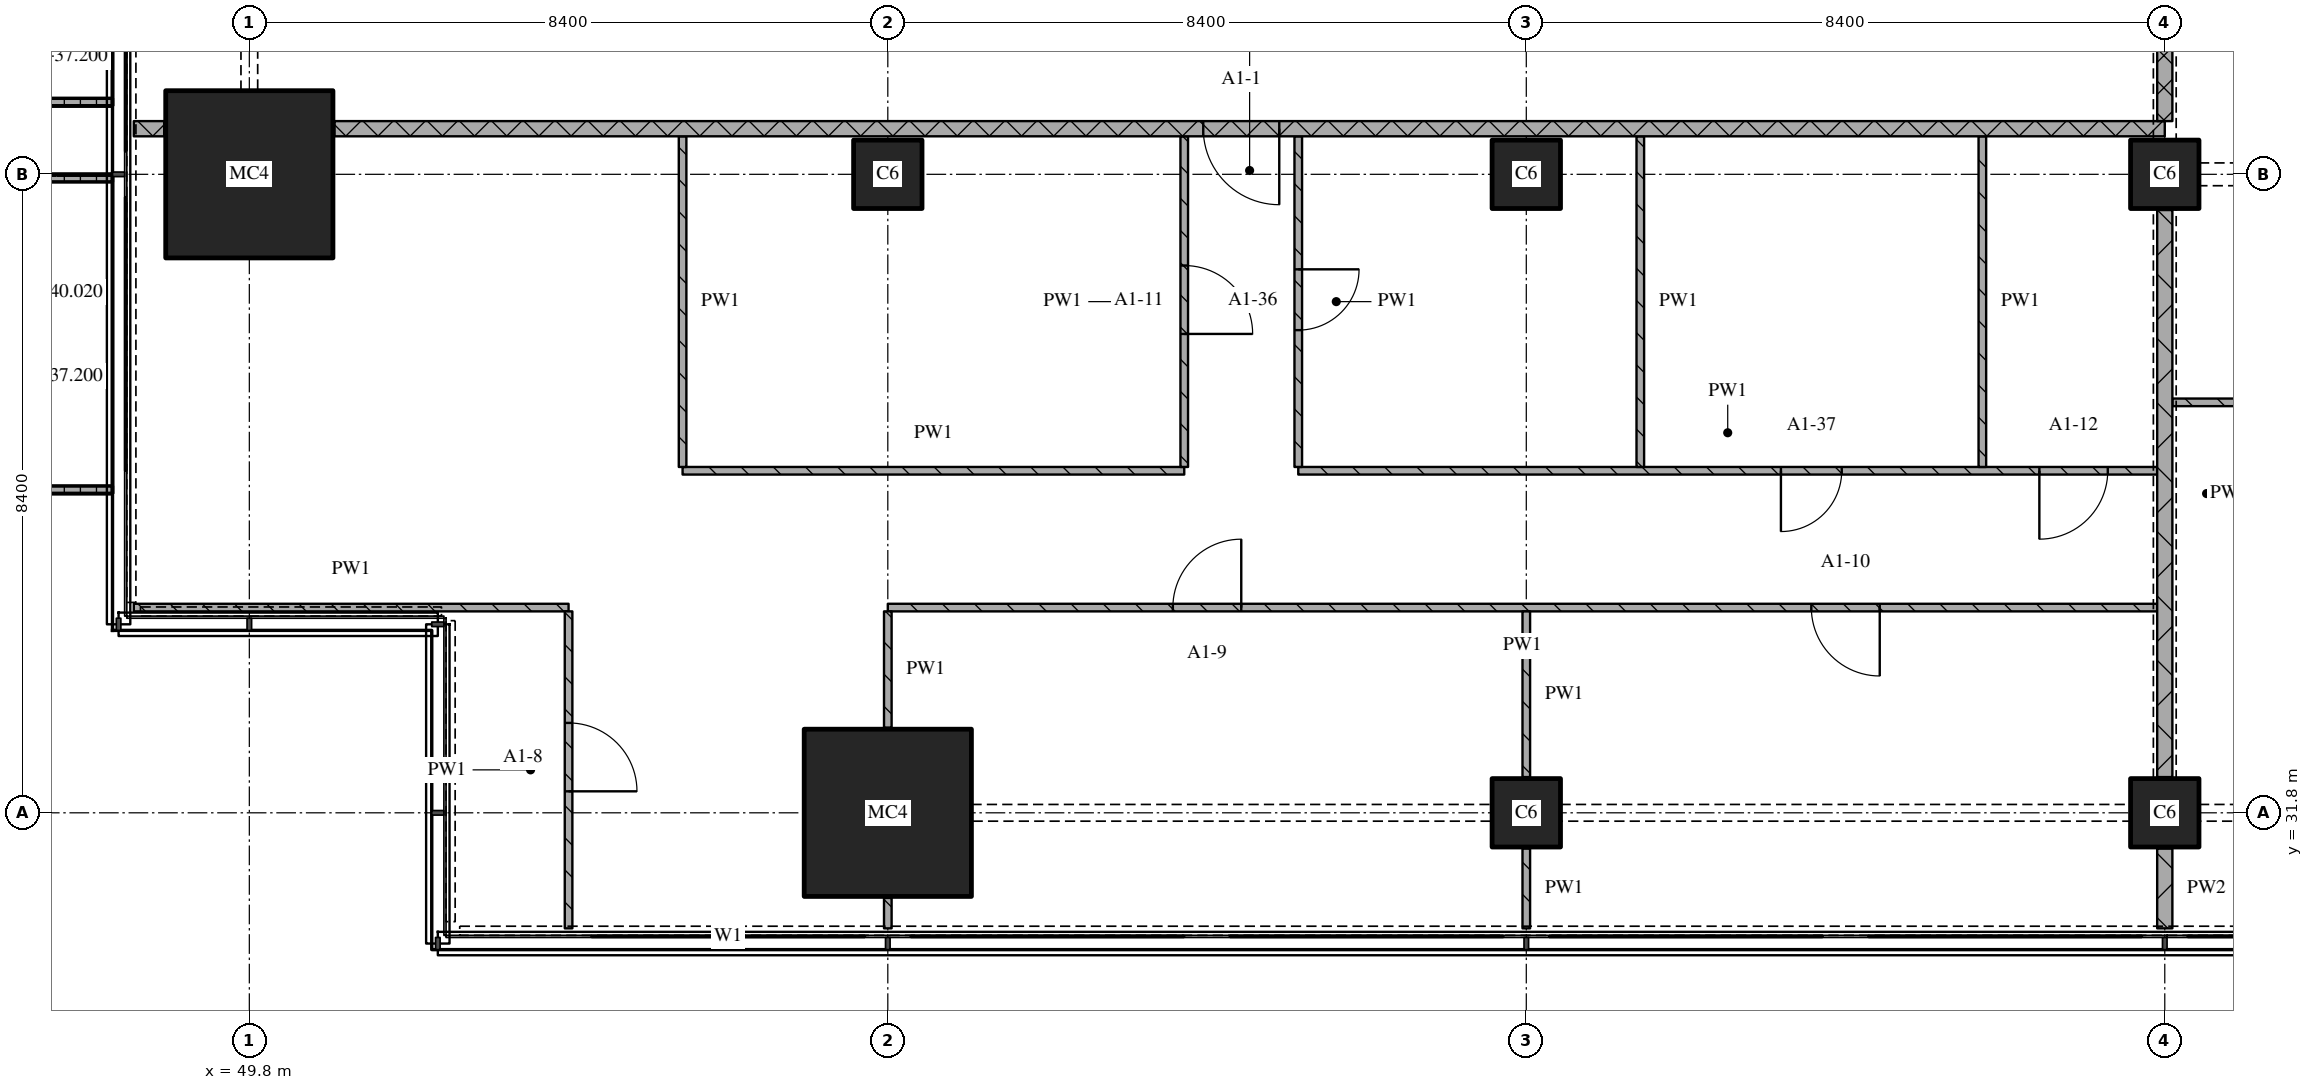
"""IFC4 building model, lengths in metres.
Left out: names, types, materials, properties, quantities, classifications, styles, units other than length and angle.
Written with IfcOpenShell. Run it as: python <this file> out.ifc"""

import sys

from ifc_helpers import new_model, si_unit, direction, frame, frame_2d, origin, origin_2d, place, context, subcontext, project, spatial, polyline, rectangle, outline, extrude, element, fill, save


model = new_model("IFC4")
c1 = context("Model", 3, precision=1e-05, world=origin(), true_north=direction((0.0, 1.0)))
c2 = subcontext(c1, "Body", "Model", "MODEL_VIEW")
j1 = project(units=[si_unit("LENGTHUNIT", "METRE"), si_unit("PLANEANGLEUNIT", "RADIAN")], contexts=[c1])
p1 = place(None, origin())
s1 = spatial("IfcSite", under=j1, at=p1, CompositionType="ELEMENT")
p2 = place(p1, origin())
s2 = spatial("IfcBuilding", under=s1, at=p2, CompositionType="ELEMENT")
p3 = place(p2, frame((0.0, 0.0, 37.2)))
s3 = spatial("IfcBuildingStorey", under=s2, at=p3, CompositionType="ELEMENT", Elevation=37.2)
for number, where, z_axis, x_axis in (
    (1, (49.8, 40.2, 0.0), (0.0, 0.0, 1.0), (1.0, 0.0, 0.0)),
    (2, (58.2, 31.8, 0.0), (0.0, 0.0, 1.0), (1.0, 0.0, 0.0)),
):
    element("IfcColumn", number, at=place(p3, frame(where, z_axis=z_axis, x_axis=x_axis)), inside=s3, PredefinedType="COLUMN", context=c2, shape_type="SweptSolid", body=[
        extrude(rectangle(XDim=2.2, YDim=2.2, at=origin_2d()), origin(), (0.0, 0.0, 1.0), 3.6),
    ])
for number, where, z_axis, x_axis in (
    (3, (58.2, 40.2, 0.0), (0.0, 0.0, 1.0), (1.0, 0.0, 0.0)),
    (4, (66.6, 31.8, 0.0), (0.0, 0.0, 1.0), (1.0, 0.0, 0.0)),
    (5, (66.6, 40.2, 0.0), (0.0, 0.0, 1.0), (1.0, 0.0, 0.0)),
    (6, (75.0, 31.8, 0.0), (0.0, 0.0, 1.0), (1.0, 0.0, 0.0)),
    (7, (75.0, 40.2, 0.0), (0.0, 0.0, 1.0), (1.0, 0.0, 0.0)),
):
    element("IfcColumn", number, at=place(p3, frame(where, z_axis=z_axis, x_axis=x_axis)), inside=s3, PredefinedType="COLUMN", context=c2, shape_type="SweptSolid", body=[
        extrude(rectangle(XDim=0.9, YDim=0.9, at=origin_2d()), origin(), (0.0, 0.0, 1.0), 3.6),
    ])
p4 = place(p3, origin())
e8 = element("IfcWall", 8, at=p4, inside=s3, PredefinedType="SOLIDWALL", context=c2, shape_type="SweptSolid", body=[
    extrude(outline(polyline([(48.0, 43.5), (48.0, 43.4), (46.5, 43.4), (46.5, 41.2), (48.0, 41.2), (48.0, 41.1), (46.4, 41.1), (46.4, 43.5), (48.0, 43.5)])), origin(), (0.0, 0.0, 1.0), 1.0),
])
p5 = place(p3, origin())
e9 = element("IfcWall", 9, at=p5, inside=s3, PredefinedType="SOLIDWALL", context=c2, shape_type="SweptSolid", body=[
    extrude(outline(polyline([(48.0, 40.2), (48.0, 40.1), (46.367, 40.1), (46.367, 36.1), (48.0, 36.1), (48.0, 36.0), (46.267, 36.0), (46.267, 40.2), (48.0, 40.2)])), origin(), (0.0, 0.0, 1.0), 1.0),
])
p6 = place(p3, frame((48.28, 34.5, 0.0), z_axis=(0.0, 0.0, 1.0), x_axis=(1.0, 0.0, 0.0)))
e10 = element("IfcWall", 10, at=p6, inside=s3, PredefinedType="PARTITIONING", context=c2, shape_type="SweptSolid", body=[
    extrude(rectangle(XDim=5.72, YDim=0.1, at=frame_2d((2.86, 0.0))), origin(), (0.0, 0.0, 1.0), 3.32),
])
p7 = place(p3, frame((74.9, 34.5, 0.0), z_axis=(0.0, 0.0, 1.0), x_axis=(-1.0, 0.0, 0.0)))
e11 = element("IfcWall", 11, at=p7, inside=s3, PredefinedType="PARTITIONING", context=c2, shape_type="SweptSolid", body=[
    extrude(rectangle(XDim=16.7, YDim=0.1, at=frame_2d((8.35, 0.0))), origin(), (0.0, 0.0, 1.0), 3.32),
])
p8 = place(p7, frame((3.65, 0.0, 0.0)))
e12 = element("IfcOpeningElement", 12, at=p8, cuts=e11, PredefinedType="OPENING", context=c2, shape_type="SweptSolid", body=[
    extrude(rectangle(XDim=0.9, YDim=2.1, at=frame_2d((0.45, 1.05))), frame((0.0, 0.06, 0.0), z_axis=(0.0, -1.0, 0.0), x_axis=(1.0, 0.0, 0.0)), (0.0, 0.0, 1.0), 0.12),
])
p9 = place(p7, frame((12.05, 0.0, 0.0)))
e13 = element("IfcOpeningElement", 13, at=p9, cuts=e11, PredefinedType="OPENING", context=c2, shape_type="SweptSolid", body=[
    extrude(rectangle(XDim=0.9, YDim=2.1, at=frame_2d((0.45, 1.05))), frame((0.0, 0.06, 0.0), z_axis=(0.0, -1.0, 0.0), x_axis=(1.0, 0.0, 0.0)), (0.0, 0.0, 1.0), 0.12),
])
p10 = place(p3, frame((55.5, 36.3, 0.0), z_axis=(0.0, 0.0, 1.0), x_axis=(1.0, 0.0, 0.0)))
e14 = element("IfcWall", 14, at=p10, inside=s3, PredefinedType="PARTITIONING", context=c2, shape_type="SweptSolid", body=[
    extrude(rectangle(XDim=6.6, YDim=0.1, at=frame_2d((3.3, 0.0))), origin(), (0.0, 0.0, 1.0), 3.32),
])
p11 = place(p3, frame((63.6, 36.3, 0.0), z_axis=(0.0, 0.0, 1.0), x_axis=(1.0, 0.0, 0.0)))
e15 = element("IfcWall", 15, at=p11, inside=s3, PredefinedType="PARTITIONING", context=c2, shape_type="SweptSolid", body=[
    extrude(rectangle(XDim=11.3, YDim=0.1, at=frame_2d((5.65, 0.0))), origin(), (0.0, 0.0, 1.0), 3.32),
])
p12 = place(p11, frame((6.35, 0.0, 0.0)))
e16 = element("IfcOpeningElement", 16, at=p12, cuts=e15, PredefinedType="OPENING", context=c2, shape_type="SweptSolid", body=[
    extrude(rectangle(XDim=0.8, YDim=2.1, at=frame_2d((0.4, 1.05))), frame((0.0, 0.06, 0.0), z_axis=(0.0, -1.0, 0.0), x_axis=(1.0, 0.0, 0.0)), (0.0, 0.0, 1.0), 0.12),
])
p13 = place(p11, frame((9.75, 0.0, 0.0)))
e17 = element("IfcOpeningElement", 17, at=p13, cuts=e15, PredefinedType="OPENING", context=c2, shape_type="SweptSolid", body=[
    extrude(rectangle(XDim=0.9, YDim=2.1, at=frame_2d((0.45, 1.05))), frame((0.0, 0.06, 0.0), z_axis=(0.0, -1.0, 0.0), x_axis=(1.0, 0.0, 0.0)), (0.0, 0.0, 1.0), 0.12),
])
p14 = place(p3, frame((87.6, 37.2, 0.0), z_axis=(0.0, 0.0, 1.0), x_axis=(-1.0, 0.0, 0.0)))
e18 = element("IfcWall", 18, at=p14, inside=s3, PredefinedType="PARTITIONING", context=c2, shape_type="SweptSolid", body=[
    extrude(rectangle(XDim=12.5, YDim=0.1, at=frame_2d((6.25, 0.0))), origin(), (0.0, 0.0, 1.0), 3.32),
])
p15 = place(p14, frame((5.85, 0.0, 0.0)))
e19 = element("IfcOpeningElement", 19, at=p15, cuts=e18, PredefinedType="OPENING", context=c2, shape_type="SweptSolid", body=[
    extrude(rectangle(XDim=0.9, YDim=2.1, at=frame_2d((0.45, 1.05))), frame((0.0, 0.06, 0.0), z_axis=(0.0, -1.0, 0.0), x_axis=(1.0, 0.0, 0.0)), (0.0, 0.0, 1.0), 0.12),
])
p16 = place(p14, frame((10.05, 0.0, 0.0)))
e20 = element("IfcOpeningElement", 20, at=p16, cuts=e18, PredefinedType="OPENING", context=c2, shape_type="SweptSolid", body=[
    extrude(rectangle(XDim=0.9, YDim=2.1, at=frame_2d((0.45, 1.05))), frame((0.0, 0.06, 0.0), z_axis=(0.0, -1.0, 0.0), x_axis=(1.0, 0.0, 0.0)), (0.0, 0.0, 1.0), 0.12),
])
p17 = place(p3, frame((48.28, 40.8, 0.0), z_axis=(0.0, 0.0, 1.0), x_axis=(1.0, 0.0, 0.0)))
e21 = element("IfcWall", 21, at=p17, inside=s3, PredefinedType="PARTITIONING", context=c2, shape_type="SweptSolid", body=[
    extrude(rectangle(XDim=0.4, YDim=0.2, at=frame_2d((0.2, 0.0))), origin(), (0.0, 0.0, 1.0), 3.32),
])
p18 = place(p3, frame((75.0, 40.8, 0.0), z_axis=(0.0, 0.0, 1.0), x_axis=(-1.0, 0.0, 0.0)))
e22 = element("IfcWall", 22, at=p18, inside=s3, PredefinedType="PARTITIONING", context=c2, shape_type="SweptSolid", body=[
    extrude(rectangle(XDim=24.08, YDim=0.2, at=frame_2d((12.04, 0.0))), origin(), (0.0, 0.0, 1.0), 3.32),
])
p19 = place(p18, frame((11.65, 0.0, 0.0)))
e23 = element("IfcOpeningElement", 23, at=p19, cuts=e22, PredefinedType="OPENING", context=c2, shape_type="SweptSolid", body=[
    extrude(rectangle(XDim=1.0, YDim=2.1, at=frame_2d((0.5, 1.05))), frame((0.0, 0.11, 0.0), z_axis=(0.0, -1.0, 0.0), x_axis=(1.0, 0.0, 0.0)), (0.0, 0.0, 1.0), 0.22),
])
p20 = place(p3, frame((54.0, 30.28, 0.0), z_axis=(0.0, 0.0, 1.0), x_axis=(0.0, 1.0, 0.0)))
e24 = element("IfcWall", 24, at=p20, inside=s3, PredefinedType="PARTITIONING", context=c2, shape_type="SweptSolid", body=[
    extrude(rectangle(XDim=4.17, YDim=0.1, at=frame_2d((2.085, 0.0))), origin(), (0.0, 0.0, 1.0), 3.32),
])
p21 = place(p20, frame((1.803, 0.0, 0.0)))
e25 = element("IfcOpeningElement", 25, at=p21, cuts=e24, PredefinedType="OPENING", context=c2, shape_type="SweptSolid", body=[
    extrude(rectangle(XDim=0.9, YDim=2.1, at=frame_2d((0.45, 1.05))), frame((0.0, 0.06, 0.0), z_axis=(0.0, -1.0, 0.0), x_axis=(1.0, 0.0, 0.0)), (0.0, 0.0, 1.0), 0.12),
])
p22 = place(p3, frame((55.5, 40.7, 0.0), z_axis=(0.0, 0.0, 1.0), x_axis=(0.0, -1.0, 0.0)))
e26 = element("IfcWall", 26, at=p22, inside=s3, PredefinedType="PARTITIONING", context=c2, shape_type="SweptSolid", body=[
    extrude(rectangle(XDim=4.35, YDim=0.1, at=frame_2d((2.175, 0.0))), origin(), (0.0, 0.0, 1.0), 3.32),
])
p23 = place(p3, frame((58.2, 30.68, 0.0), z_axis=(0.0, 0.0, 1.0), x_axis=(0.0, -1.0, 0.0)))
e27 = element("IfcWall", 27, at=p23, inside=s3, PredefinedType="PARTITIONING", context=c2, shape_type="SweptSolid", body=[
    extrude(rectangle(XDim=0.4, YDim=0.1, at=frame_2d((0.2, 0.0))), origin(), (0.0, 0.0, 1.0), 3.32),
])
p24 = place(p3, frame((58.2, 34.45, 0.0), z_axis=(0.0, 0.0, 1.0), x_axis=(0.0, -1.0, 0.0)))
e28 = element("IfcWall", 28, at=p24, inside=s3, PredefinedType="PARTITIONING", context=c2, shape_type="SweptSolid", body=[
    extrude(rectangle(XDim=1.53, YDim=0.1, at=frame_2d((0.765, 0.0))), origin(), (0.0, 0.0, 1.0), 3.32),
])
p25 = place(p3, frame((62.1, 36.35, 0.0), z_axis=(0.0, 0.0, 1.0), x_axis=(0.0, 1.0, 0.0)))
e29 = element("IfcWall", 29, at=p25, inside=s3, PredefinedType="PARTITIONING", context=c2, shape_type="SweptSolid", body=[
    extrude(rectangle(XDim=4.35, YDim=0.1, at=frame_2d((2.175, 0.0))), origin(), (0.0, 0.0, 1.0), 3.32),
])
p26 = place(p25, frame((1.75, 0.0, 0.0)))
e30 = element("IfcOpeningElement", 30, at=p26, cuts=e29, PredefinedType="OPENING", context=c2, shape_type="SweptSolid", body=[
    extrude(rectangle(XDim=0.9, YDim=2.1, at=frame_2d((0.45, 1.05))), frame((0.0, 0.06, 0.0), z_axis=(0.0, -1.0, 0.0), x_axis=(1.0, 0.0, 0.0)), (0.0, 0.0, 1.0), 0.12),
])
p27 = place(p3, frame((63.6, 40.7, 0.0), z_axis=(0.0, 0.0, 1.0), x_axis=(0.0, -1.0, 0.0)))
e31 = element("IfcWall", 31, at=p27, inside=s3, PredefinedType="PARTITIONING", context=c2, shape_type="SweptSolid", body=[
    extrude(rectangle(XDim=4.35, YDim=0.1, at=frame_2d((2.175, 0.0))), origin(), (0.0, 0.0, 1.0), 3.32),
])
p28 = place(p27, frame((1.75, 0.0, 0.0)))
e32 = element("IfcOpeningElement", 32, at=p28, cuts=e31, PredefinedType="OPENING", context=c2, shape_type="SweptSolid", body=[
    extrude(rectangle(XDim=0.8, YDim=2.1, at=frame_2d((0.4, 1.05))), frame((0.0, 0.06, 0.0), z_axis=(0.0, -1.0, 0.0), x_axis=(1.0, 0.0, 0.0)), (0.0, 0.0, 1.0), 0.12),
])
p29 = place(p3, frame((66.6, 31.33, 0.0), z_axis=(0.0, 0.0, 1.0), x_axis=(0.0, -1.0, 0.0)))
e33 = element("IfcWall", 33, at=p29, inside=s3, PredefinedType="PARTITIONING", context=c2, shape_type="SweptSolid", body=[
    extrude(rectangle(XDim=1.05, YDim=0.1, at=frame_2d((0.525, 0.0))), origin(), (0.0, 0.0, 1.0), 3.32),
])
p30 = place(p3, frame((66.6, 34.45, 0.0), z_axis=(0.0, 0.0, 1.0), x_axis=(0.0, -1.0, 0.0)))
e34 = element("IfcWall", 34, at=p30, inside=s3, PredefinedType="PARTITIONING", context=c2, shape_type="SweptSolid", body=[
    extrude(rectangle(XDim=2.18, YDim=0.1, at=frame_2d((1.09, 0.0))), origin(), (0.0, 0.0, 1.0), 3.32),
])
for number, where, z_axis, x_axis in (
    (35, (68.1, 40.7, 0.0), (0.0, 0.0, 1.0), (0.0, -1.0, 0.0)),
    (36, (72.6, 40.7, 0.0), (0.0, 0.0, 1.0), (0.0, -1.0, 0.0)),
):
    element("IfcWall", number, at=place(p3, frame(where, z_axis=z_axis, x_axis=x_axis)), inside=s3, PredefinedType="PARTITIONING", context=c2, shape_type="SweptSolid", body=[
        extrude(rectangle(XDim=4.35, YDim=0.1, at=frame_2d((2.175, 0.0))), origin(), (0.0, 0.0, 1.0), 3.32),
    ])
p31 = place(p3, frame((75.0, 43.1, 0.0), z_axis=(0.0, 0.0, 1.0), x_axis=(0.0, -1.0, 0.0)))
e37 = element("IfcWall", 37, at=p31, inside=s3, PredefinedType="PARTITIONING", context=c2, shape_type="SweptSolid", body=[
    extrude(rectangle(XDim=2.2, YDim=0.2, at=frame_2d((1.1, 0.0))), origin(), (0.0, 0.0, 1.0), 2.43),
])
p32 = place(p3, frame((75.0, 31.33, 0.0), z_axis=(0.0, 0.0, 1.0), x_axis=(0.0, -1.0, 0.0)))
e38 = element("IfcWall", 38, at=p32, inside=s3, PredefinedType="PARTITIONING", context=c2, shape_type="SweptSolid", body=[
    extrude(rectangle(XDim=1.05, YDim=0.2, at=frame_2d((0.525, 0.0))), origin(), (0.0, 0.0, 1.0), 3.32),
])
p33 = place(p3, frame((75.0, 39.73, 0.0), z_axis=(0.0, 0.0, 1.0), x_axis=(0.0, -1.0, 0.0)))
e39 = element("IfcWall", 39, at=p33, inside=s3, PredefinedType="PARTITIONING", context=c2, shape_type="SweptSolid", body=[
    extrude(rectangle(XDim=7.46, YDim=0.2, at=frame_2d((3.73, 0.0))), origin(), (0.0, 0.0, 1.0), 2.83),
])
p34 = place(p8, origin())
e40 = element("IfcDoor", 40, at=p34, inside=s3, OperationType="SINGLE_SWING_LEFT", PredefinedType="DOOR", context=c2, shape_type="SweptSolid", body=[
    extrude(rectangle(XDim=0.9, YDim=2.1, at=frame_2d((0.45, 1.05))), frame((0.0, 0.025, 0.0), z_axis=(0.0, -1.0, 0.0), x_axis=(1.0, 0.0, 0.0)), (0.0, 0.0, 1.0), 0.05),
])
fill(e12, e40)
p35 = place(p9, origin())
e41 = element("IfcDoor", 41, at=p35, inside=s3, OperationType="SINGLE_SWING_RIGHT", PredefinedType="DOOR", context=c2, shape_type="SweptSolid", body=[
    extrude(rectangle(XDim=0.9, YDim=2.1, at=frame_2d((0.45, 1.05))), frame((0.0, 0.025, 0.0), z_axis=(0.0, -1.0, 0.0), x_axis=(1.0, 0.0, 0.0)), (0.0, 0.0, 1.0), 0.05),
])
fill(e13, e41)
p36 = place(p12, origin())
e42 = element("IfcDoor", 42, at=p36, inside=s3, OperationType="SINGLE_SWING_RIGHT", PredefinedType="DOOR", context=c2, shape_type="SweptSolid", body=[
    extrude(rectangle(XDim=0.8, YDim=2.1, at=frame_2d((0.4, 1.05))), frame((0.0, 0.025, 0.0), z_axis=(0.0, -1.0, 0.0), x_axis=(1.0, 0.0, 0.0)), (0.0, 0.0, 1.0), 0.05),
])
fill(e16, e42)
p37 = place(p13, origin())
e43 = element("IfcDoor", 43, at=p37, inside=s3, OperationType="SINGLE_SWING_RIGHT", PredefinedType="DOOR", context=c2, shape_type="SweptSolid", body=[
    extrude(rectangle(XDim=0.9, YDim=2.1, at=frame_2d((0.45, 1.05))), frame((0.0, 0.025, 0.0), z_axis=(0.0, -1.0, 0.0), x_axis=(1.0, 0.0, 0.0)), (0.0, 0.0, 1.0), 0.05),
])
fill(e17, e43)
p38 = place(p19, origin())
e44 = element("IfcDoor", 44, at=p38, inside=s3, OperationType="SINGLE_SWING_LEFT", PredefinedType="DOOR", context=c2, shape_type="SweptSolid", body=[
    extrude(rectangle(XDim=1.0, YDim=2.1, at=frame_2d((0.5, 1.05))), frame((0.0, 0.025, 0.0), z_axis=(0.0, -1.0, 0.0), x_axis=(1.0, 0.0, 0.0)), (0.0, 0.0, 1.0), 0.05),
])
fill(e23, e44)
p39 = place(p21, origin())
e45 = element("IfcDoor", 45, at=p39, inside=s3, OperationType="SINGLE_SWING_RIGHT", PredefinedType="DOOR", context=c2, shape_type="SweptSolid", body=[
    extrude(rectangle(XDim=0.9, YDim=2.1, at=frame_2d((0.45, 1.05))), frame((0.0, 0.025, 0.0), z_axis=(0.0, -1.0, 0.0), x_axis=(1.0, 0.0, 0.0)), (0.0, 0.0, 1.0), 0.05),
])
fill(e25, e45)
p40 = place(p26, origin())
e46 = element("IfcDoor", 46, at=p40, inside=s3, OperationType="SINGLE_SWING_RIGHT", PredefinedType="DOOR", context=c2, shape_type="SweptSolid", body=[
    extrude(rectangle(XDim=0.9, YDim=2.1, at=frame_2d((0.45, 1.05))), frame((0.0, 0.025, 0.0), z_axis=(0.0, -1.0, 0.0), x_axis=(1.0, 0.0, 0.0)), (0.0, 0.0, 1.0), 0.05),
])
fill(e30, e46)
p41 = place(p28, origin())
e47 = element("IfcDoor", 47, at=p41, inside=s3, OperationType="SINGLE_SWING_LEFT", PredefinedType="DOOR", context=c2, shape_type="SweptSolid", body=[
    extrude(rectangle(XDim=0.8, YDim=2.1, at=frame_2d((0.4, 1.05))), frame((0.0, 0.025, 0.0), z_axis=(0.0, -1.0, 0.0), x_axis=(1.0, 0.0, 0.0)), (0.0, 0.0, 1.0), 0.05),
])
fill(e32, e47)
save(model, sys.argv[1])
